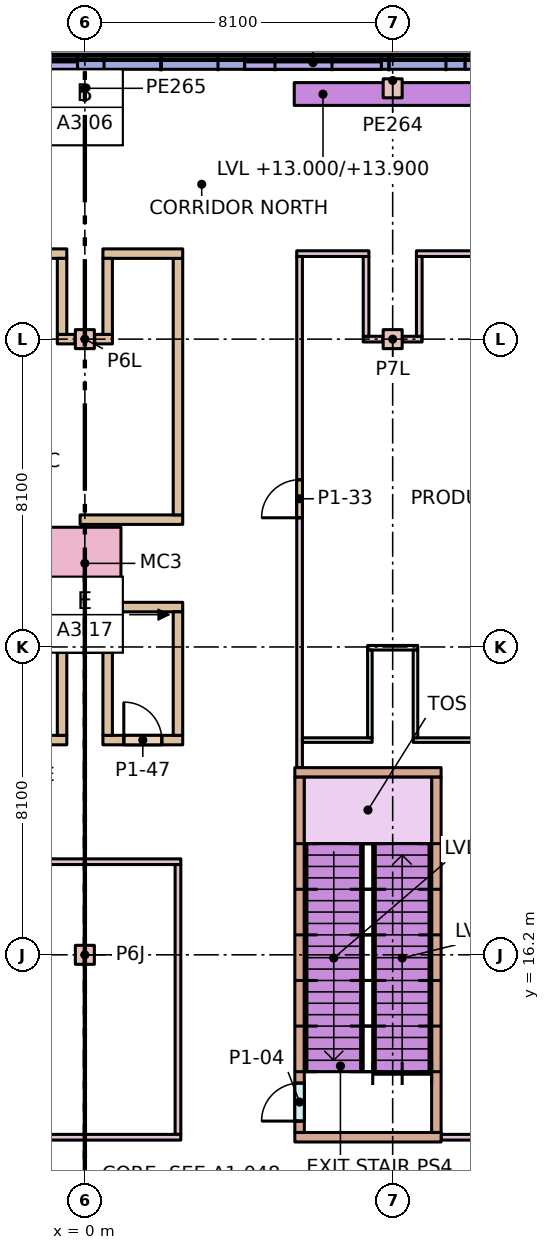
"""IFC4 building model, lengths in metres.
Left out: names, types, materials, properties, quantities, classifications, styles, units other than length and angle.
Written with IfcOpenShell. Run it as: python <this file> out.ifc"""

import sys

from ifc_helpers import new_model, si_unit, direction, frame, frame_2d, origin, origin_2d, place, context, subcontext, project, spatial, rectangle, extrude, element, fill, save


model = new_model("IFC4")
c1 = context("Model", 3, precision=1e-05, world=origin(), true_north=direction((0.0, 1.0)))
c2 = subcontext(c1, "Body", "Model", "MODEL_VIEW")
j1 = project(units=[si_unit("LENGTHUNIT", "METRE"), si_unit("PLANEANGLEUNIT", "RADIAN")], contexts=[c1])
p1 = place(None, origin())
s1 = spatial("IfcSite", under=j1, at=p1, CompositionType="ELEMENT")
p2 = place(p1, origin())
s2 = spatial("IfcBuilding", under=s1, at=p2, CompositionType="ELEMENT")
p3 = place(p2, frame((0.0, 0.0, 6.0)))
s3 = spatial("IfcBuildingStorey", under=s2, at=p3, CompositionType="ELEMENT", Elevation=6.0)
for number, where, z_axis, x_axis in (
    (1, (0.0, 16.2, 0.0), (0.0, 0.0, 1.0), (1.0, 0.0, 0.0)),
    (2, (0.0, 32.4, 0.0), (0.0, 0.0, 1.0), (1.0, 0.0, 0.0)),
    (3, (8.1, 32.4, 0.0), (0.0, 0.0, 1.0), (1.0, 0.0, 0.0)),
    (4, (8.1, 39.0, 0.0), (0.0, 0.0, 1.0), (1.0, 0.0, 0.0)),
    (5, (0.0, 39.0, 0.0), (0.0, 0.0, 1.0), (1.0, 0.0, 0.0)),
):
    element("IfcColumn", number, at=place(p3, frame(where, z_axis=z_axis, x_axis=x_axis)), inside=s3, PredefinedType="COLUMN", context=c2, shape_type="SweptSolid", body=[
        extrude(rectangle(XDim=0.5, YDim=0.5, at=origin_2d()), origin(), (0.0, 0.0, 1.0), 7.0),
    ])
p4 = place(p3, frame((0.0, 26.5, 0.0), z_axis=(0.0, 0.0, 1.0), x_axis=(-1.0, 0.0, 0.0)))
e6 = element("IfcColumn", 6, at=p4, inside=s3, PredefinedType="COLUMN", context=c2, shape_type="SweptSolid", body=[
    extrude(rectangle(XDim=1.9, YDim=1.9, at=origin_2d()), origin(), (0.0, 0.0, 1.0), 7.0),
])
p5 = place(p3, frame((17.998, 39.675, 0.0), z_axis=(0.0, 0.0, 1.0), x_axis=(-1.0, 0.0, 0.0)))
e7 = element("IfcWall", 7, at=p5, inside=s3, PredefinedType="STANDARD", context=c2, shape_type="SweptSolid", body=[
    extrude(rectangle(XDim=7.997, YDim=0.35, at=frame_2d((3.998, 0.0))), origin(), (0.0, 0.0, 1.0), 6.68),
])
p6 = place(p5, frame((2.198, 0.0, 1.0)))
e8 = element("IfcOpeningElement", 8, at=p6, cuts=e7, PredefinedType="OPENING", context=c2, shape_type="SweptSolid", body=[
    extrude(rectangle(XDim=3.6, YDim=4.0, at=frame_2d((1.8, 2.0))), frame((0.0, 0.185, 0.0), z_axis=(0.0, -1.0, 0.0), x_axis=(1.0, 0.0, 0.0)), (0.0, 0.0, 1.0), 0.37),
])
p7 = place(p3, frame((10.002, 39.675, 0.0), z_axis=(0.0, 0.0, 1.0), x_axis=(-1.0, 0.0, 0.0)))
e9 = element("IfcWall", 9, at=p7, inside=s3, PredefinedType="STANDARD", context=c2, shape_type="SweptSolid", body=[
    extrude(rectangle(XDim=7.996, YDim=0.35, at=frame_2d((3.998, 0.0))), origin(), (0.0, 0.0, 1.0), 6.68),
])
p8 = place(p7, frame((2.198, 0.0, 1.0)))
e10 = element("IfcOpeningElement", 10, at=p8, cuts=e9, PredefinedType="OPENING", context=c2, shape_type="SweptSolid", body=[
    extrude(rectangle(XDim=3.6, YDim=4.0, at=frame_2d((1.8, 2.0))), frame((0.0, 0.185, 0.0), z_axis=(0.0, -1.0, 0.0), x_axis=(1.0, 0.0, 0.0)), (0.0, 0.0, 1.0), 0.37),
])
p9 = place(p3, frame((2.005, 39.675, 0.0), z_axis=(0.0, 0.0, 1.0), x_axis=(-1.0, 0.0, 0.0)))
e11 = element("IfcWall", 11, at=p9, inside=s3, PredefinedType="STANDARD", context=c2, shape_type="SweptSolid", body=[
    extrude(rectangle(XDim=7.997, YDim=0.35, at=frame_2d((3.998, 0.0))), origin(), (0.0, 0.0, 1.0), 6.68),
])
p10 = place(p9, frame((2.198, 0.0, 1.0)))
e12 = element("IfcOpeningElement", 12, at=p10, cuts=e11, PredefinedType="OPENING", context=c2, shape_type="SweptSolid", body=[
    extrude(rectangle(XDim=3.6, YDim=4.0, at=frame_2d((1.8, 2.0))), frame((0.0, 0.185, 0.0), z_axis=(0.0, -1.0, 0.0), x_axis=(1.0, 0.0, 0.0)), (0.0, 0.0, 1.0), 0.37),
])
p11 = place(p3, frame((10.51, 38.85, 7.0), z_axis=(0.0, 0.0, 1.0), x_axis=(-1.0, 0.0, 0.0)))
e13 = element("IfcWall", 13, at=p11, inside=s3, PredefinedType="PARAPET", context=c2, shape_type="SweptSolid", body=[
    extrude(rectangle(XDim=5.0, YDim=0.6, at=frame_2d((2.5, 0.0))), origin(), (0.0, 0.0, 1.0), 0.9),
])
p12 = place(p3, frame((7.325, 32.4, 0.0), z_axis=(0.0, 0.0, 1.0), x_axis=(1.0, 0.0, 0.0)))
e14 = element("IfcWall", 14, at=p12, inside=s3, PredefinedType="PARTITIONING", context=c2, shape_type="SweptSolid", body=[
    extrude(rectangle(XDim=0.515, YDim=0.15, at=frame_2d((0.258, 0.0))), origin(), (0.0, 0.0, 1.0), 6.68),
])
p13 = place(p3, frame((8.36, 32.4, 0.0), z_axis=(0.0, 0.0, 1.0), x_axis=(1.0, 0.0, 0.0)))
e15 = element("IfcWall", 15, at=p13, inside=s3, PredefinedType="PARTITIONING", context=c2, shape_type="SweptSolid", body=[
    extrude(rectangle(XDim=0.515, YDim=0.15, at=frame_2d((0.257, 0.0))), origin(), (0.0, 0.0, 1.0), 6.68),
])
p14 = place(p3, frame((5.575, 34.65, 0.0), z_axis=(0.0, 0.0, 1.0), x_axis=(1.0, 0.0, 0.0)))
e16 = element("IfcWall", 16, at=p14, inside=s3, PredefinedType="PARTITIONING", context=c2, shape_type="SweptSolid", body=[
    extrude(rectangle(XDim=1.9, YDim=0.15, at=frame_2d((0.95, 0.0))), origin(), (0.0, 0.0, 1.0), 6.68),
])
p15 = place(p3, frame((8.725, 34.65, 0.0), z_axis=(0.0, 0.0, 1.0), x_axis=(1.0, 0.0, 0.0)))
e17 = element("IfcWall", 17, at=p15, inside=s3, PredefinedType="PARTITIONING", context=c2, shape_type="SweptSolid", body=[
    extrude(rectangle(XDim=16.443, YDim=0.15, at=frame_2d((8.221, 0.0))), origin(), (0.0, 0.0, 1.0), 6.68),
])
p16 = place(p15, frame((11.031, 0.0, 0.0)))
e18 = element("IfcOpeningElement", 18, at=p16, cuts=e17, PredefinedType="OPENING", context=c2, shape_type="SweptSolid", body=[
    extrude(rectangle(XDim=1.0, YDim=2.1, at=frame_2d((0.5, 1.05))), frame((0.0, 0.085, 0.0), z_axis=(0.0, -1.0, 0.0), x_axis=(1.0, 0.0, 0.0)), (0.0, 0.0, 1.0), 0.17),
])
for number, where, z_axis, x_axis in (
    (19, (7.4, 32.475, 0.0), (0.0, 0.0, 1.0), (0.0, 1.0, 0.0)),
    (20, (8.8, 32.475, 0.0), (0.0, 0.0, 1.0), (0.0, 1.0, 0.0)),
):
    element("IfcWall", number, at=place(p3, frame(where, z_axis=z_axis, x_axis=x_axis)), inside=s3, PredefinedType="PARTITIONING", context=c2, shape_type="SweptSolid", body=[
        extrude(rectangle(XDim=2.1, YDim=0.15, at=frame_2d((1.05, 0.0))), origin(), (0.0, 0.0, 1.0), 6.68),
    ])
p17 = place(p3, frame((5.725, 21.85, 0.0), z_axis=(0.0, 0.0, 1.0), x_axis=(1.0, 0.0, 0.0)))
e21 = element("IfcWall", 21, at=p17, inside=s3, PredefinedType="PARTITIONING", context=c2, shape_type="SweptSolid", body=[
    extrude(rectangle(XDim=1.835, YDim=0.12, at=frame_2d((0.917, 0.0))), origin(), (0.0, 0.0, 1.0), 6.68),
])
p18 = place(p3, frame((8.64, 21.85, 0.0), z_axis=(0.0, 0.0, 1.0), x_axis=(1.0, 0.0, 0.0)))
e22 = element("IfcWall", 22, at=p18, inside=s3, PredefinedType="PARTITIONING", context=c2, shape_type="SweptSolid", body=[
    extrude(rectangle(XDim=16.528, YDim=0.12, at=frame_2d((8.264, 0.0))), origin(), (0.0, 0.0, 1.0), 6.68),
])
p19 = place(p3, frame((7.44, 24.28, 0.0), z_axis=(0.0, 0.0, 1.0), x_axis=(1.0, 0.0, 0.0)))
e23 = element("IfcWall", 23, at=p19, inside=s3, PredefinedType="PARTITIONING", context=c2, shape_type="SweptSolid", body=[
    extrude(rectangle(XDim=1.32, YDim=0.12, at=frame_2d((0.66, 0.0))), origin(), (0.0, 0.0, 1.0), 6.68),
])
for number, where, z_axis, x_axis in (
    (24, (7.5, 21.91, 0.0), (0.0, 0.0, 1.0), (0.0, 1.0, 0.0)),
    (25, (8.7, 21.91, 0.0), (0.0, 0.0, 1.0), (0.0, 1.0, 0.0)),
):
    element("IfcWall", number, at=place(p3, frame(where, z_axis=z_axis, x_axis=x_axis)), inside=s3, PredefinedType="PARTITIONING", context=c2, shape_type="SweptSolid", body=[
        extrude(rectangle(XDim=2.31, YDim=0.12, at=frame_2d((1.155, 0.0))), origin(), (0.0, 0.0, 1.0), 6.68),
    ])
p20 = place(p3, frame((-10.593, 21.85, 0.0), z_axis=(0.0, 0.0, 1.0), x_axis=(1.0, 0.0, 0.0)))
e26 = element("IfcWall", 26, at=p20, inside=s3, PredefinedType="PARTITIONING", context=c2, shape_type="SweptSolid", body=[
    extrude(rectangle(XDim=10.118, YDim=0.25, at=frame_2d((5.059, 0.0))), origin(), (0.0, 0.0, 1.0), 6.68),
])
p21 = place(p3, frame((0.475, 21.85, 0.0), z_axis=(0.0, 0.0, 1.0), x_axis=(1.0, 0.0, 0.0)))
e27 = element("IfcWall", 27, at=p21, inside=s3, PredefinedType="PARTITIONING", context=c2, shape_type="SweptSolid", body=[
    extrude(rectangle(XDim=2.1, YDim=0.25, at=frame_2d((1.05, 0.0))), origin(), (0.0, 0.0, 1.0), 6.68),
])
p22 = place(p21, frame((0.55, 0.0, 0.0)))
e28 = element("IfcOpeningElement", 28, at=p22, cuts=e27, PredefinedType="OPENING", context=c2, shape_type="SweptSolid", body=[
    extrude(rectangle(XDim=1.0, YDim=2.1, at=frame_2d((0.5, 1.05))), frame((0.0, 0.135, 0.0), z_axis=(0.0, -1.0, 0.0), x_axis=(1.0, 0.0, 0.0)), (0.0, 0.0, 1.0), 0.27),
])
p23 = place(p3, frame((-0.725, 24.28, 0.0), z_axis=(0.0, 0.0, 1.0), x_axis=(1.0, 0.0, 0.0)))
e29 = element("IfcWall", 29, at=p23, inside=s3, PredefinedType="PARTITIONING", context=c2, shape_type="SweptSolid", body=[
    extrude(rectangle(XDim=1.45, YDim=0.25, at=frame_2d((0.725, 0.0))), origin(), (0.0, 0.0, 1.0), 6.68),
])
for number, where, z_axis, x_axis in (
    (30, (-0.6, 21.975, 0.0), (0.0, 0.0, 1.0), (0.0, 1.0, 0.0)),
    (31, (0.6, 21.975, 0.0), (0.0, 0.0, 1.0), (0.0, 1.0, 0.0)),
):
    element("IfcWall", number, at=place(p3, frame(where, z_axis=z_axis, x_axis=x_axis)), inside=s3, PredefinedType="PARTITIONING", context=c2, shape_type="SweptSolid", body=[
        extrude(rectangle(XDim=2.18, YDim=0.25, at=frame_2d((1.09, 0.0))), origin(), (0.0, 0.0, 1.0), 6.68),
    ])
p24 = place(p3, frame((-17.778, 18.65, 0.0), z_axis=(0.0, 0.0, 1.0), x_axis=(1.0, 0.0, 0.0)))
e32 = element("IfcWall", 32, at=p24, inside=s3, PredefinedType="PARTITIONING", context=c2, shape_type="SweptSolid", body=[
    extrude(rectangle(XDim=20.303, YDim=0.15, at=frame_2d((10.152, 0.0))), origin(), (0.0, 0.0, 1.0), 6.68),
])
p25 = place(p24, frame((9.65, 0.0, 0.0)))
e33 = element("IfcOpeningElement", 33, at=p25, cuts=e32, PredefinedType="OPENING", context=c2, shape_type="SweptSolid", body=[
    extrude(rectangle(XDim=1.0, YDim=2.1, at=frame_2d((0.5, 1.05))), frame((0.0, 0.085, 0.0), z_axis=(0.0, -1.0, 0.0), x_axis=(1.0, 0.0, 0.0)), (0.0, 0.0, 1.0), 0.17),
])
p26 = place(p3, frame((5.65, 21.125, 0.0), z_axis=(0.0, 0.0, 1.0), x_axis=(0.0, 1.0, 0.0)))
e34 = element("IfcWall", 34, at=p26, inside=s3, PredefinedType="PARTITIONING", context=c2, shape_type="SweptSolid", body=[
    extrude(rectangle(XDim=13.45, YDim=0.15, at=frame_2d((6.725, 0.0))), origin(), (0.0, 0.0, 1.0), 6.68),
])
p27 = place(p26, frame((6.575, 0.0, 0.0)))
e35 = element("IfcOpeningElement", 35, at=p27, cuts=e34, PredefinedType="OPENING", context=c2, shape_type="SweptSolid", body=[
    extrude(rectangle(XDim=1.0, YDim=2.1, at=frame_2d((0.5, 1.05))), frame((0.0, 0.085, 0.0), z_axis=(0.0, -1.0, 0.0), x_axis=(1.0, 0.0, 0.0)), (0.0, 0.0, 1.0), 0.17),
])
p28 = place(p3, frame((5.525, 21.0, 0.0), z_axis=(0.0, 0.0, 1.0), x_axis=(1.0, 0.0, 0.0)))
e36 = element("IfcWall", 36, at=p28, inside=s3, PredefinedType="STANDARD", context=c2, shape_type="SweptSolid", body=[
    extrude(rectangle(XDim=3.85, YDim=0.25, at=frame_2d((1.925, 0.0))), origin(), (0.0, 0.0, 1.0), 6.68),
])
p29 = place(p3, frame((9.25, 11.525, 0.0), z_axis=(0.0, 0.0, 1.0), x_axis=(0.0, 1.0, 0.0)))
e37 = element("IfcWall", 37, at=p29, inside=s3, PredefinedType="STANDARD", context=c2, shape_type="SweptSolid", body=[
    extrude(rectangle(XDim=9.35, YDim=0.25, at=frame_2d((4.675, 0.0))), origin(), (0.0, 0.0, 1.0), 6.68),
])
p30 = place(p3, frame((9.375, 11.4, 0.0), z_axis=(0.0, 0.0, 1.0), x_axis=(1.0, 0.0, 0.0)))
e38 = element("IfcWall", 38, at=p30, inside=s3, PredefinedType="PARTITIONING", context=c2, shape_type="SweptSolid", body=[
    extrude(rectangle(XDim=4.1, YDim=0.15, at=frame_2d((2.05, 0.0))), origin(), (0.0, 0.0, 1.0), 6.68),
])
p31 = place(p30, frame((1.55, 0.0, 0.0)))
e39 = element("IfcOpeningElement", 39, at=p31, cuts=e38, PredefinedType="OPENING", context=c2, shape_type="SweptSolid", body=[
    extrude(rectangle(XDim=1.0, YDim=2.1, at=frame_2d((0.5, 1.05))), frame((0.0, 0.085, 0.0), z_axis=(0.0, -1.0, 0.0), x_axis=(1.0, 0.0, 0.0)), (0.0, 0.0, 1.0), 0.17),
])
p32 = place(p3, frame((5.65, 11.525, 0.0), z_axis=(0.0, 0.0, 1.0), x_axis=(0.0, 1.0, 0.0)))
e40 = element("IfcWall", 40, at=p32, inside=s3, PredefinedType="STANDARD", context=c2, shape_type="SweptSolid", body=[
    extrude(rectangle(XDim=9.35, YDim=0.25, at=frame_2d((4.675, 0.0))), origin(), (0.0, 0.0, 1.0), 6.68),
])
p33 = place(p32, frame((0.3, 0.0, 0.0)))
e41 = element("IfcOpeningElement", 41, at=p33, cuts=e40, PredefinedType="OPENING", context=c2, shape_type="SweptSolid", body=[
    extrude(rectangle(XDim=1.0, YDim=2.1, at=frame_2d((0.5, 1.05))), frame((0.0, 0.135, 0.0), z_axis=(0.0, -1.0, 0.0), x_axis=(1.0, 0.0, 0.0)), (0.0, 0.0, 1.0), 0.27),
])
for number, where, z_axis, x_axis in (
    (42, (-0.125, 25.35, 0.0), (0.0, 0.0, 1.0), (1.0, 0.0, 0.0)),
    (43, (-0.125, 27.65, 0.0), (0.0, 0.0, 1.0), (1.0, 0.0, 0.0)),
):
    element("IfcWall", number, at=place(p3, frame(where, z_axis=z_axis, x_axis=x_axis)), inside=s3, PredefinedType="PARTITIONING", context=c2, shape_type="SweptSolid", body=[
        extrude(rectangle(XDim=2.7, YDim=0.25, at=frame_2d((1.35, 0.0))), origin(), (0.0, 0.0, 1.0), 6.68),
    ])
p34 = place(p3, frame((2.45, 21.975, 0.0), z_axis=(0.0, 0.0, 1.0), x_axis=(0.0, 1.0, 0.0)))
e44 = element("IfcWall", 44, at=p34, inside=s3, PredefinedType="PARTITIONING", context=c2, shape_type="SweptSolid", body=[
    extrude(rectangle(XDim=3.25, YDim=0.25, at=frame_2d((1.625, 0.0))), origin(), (0.0, 0.0, 1.0), 6.68),
])
p35 = place(p3, frame((2.45, 27.775, 0.0), z_axis=(0.0, 0.0, 1.0), x_axis=(0.0, 1.0, 0.0)))
e45 = element("IfcWall", 45, at=p35, inside=s3, PredefinedType="PARTITIONING", context=c2, shape_type="SweptSolid", body=[
    extrude(rectangle(XDim=6.75, YDim=0.25, at=frame_2d((3.375, 0.0))), origin(), (0.0, 0.0, 1.0), 6.68),
])
p36 = place(p3, frame((2.45, 11.475, 0.0), z_axis=(0.0, 0.0, 1.0), x_axis=(0.0, 1.0, 0.0)))
e46 = element("IfcWall", 46, at=p36, inside=s3, PredefinedType="PARTITIONING", context=c2, shape_type="SweptSolid", body=[
    extrude(rectangle(XDim=7.1, YDim=0.15, at=frame_2d((3.55, 0.0))), origin(), (0.0, 0.0, 1.0), 6.68),
])
for number, where, z_axis, x_axis in (
    (47, (-0.725, 32.4, 0.0), (0.0, 0.0, 1.0), (1.0, 0.0, 0.0)),
    (48, (0.26, 32.4, 0.0), (0.0, 0.0, 1.0), (1.0, 0.0, 0.0)),
):
    element("IfcWall", number, at=place(p3, frame(where, z_axis=z_axis, x_axis=x_axis)), inside=s3, PredefinedType="PARTITIONING", context=c2, shape_type="SweptSolid", body=[
        extrude(rectangle(XDim=0.465, YDim=0.25, at=frame_2d((0.232, 0.0))), origin(), (0.0, 0.0, 1.0), 6.68),
    ])
p37 = place(p3, frame((-1.025, 34.65, 0.0), z_axis=(0.0, 0.0, 1.0), x_axis=(1.0, 0.0, 0.0)))
e49 = element("IfcWall", 49, at=p37, inside=s3, PredefinedType="PARTITIONING", context=c2, shape_type="SweptSolid", body=[
    extrude(rectangle(XDim=0.55, YDim=0.25, at=frame_2d((0.275, 0.0))), origin(), (0.0, 0.0, 1.0), 6.68),
])
p38 = place(p3, frame((0.475, 34.65, 0.0), z_axis=(0.0, 0.0, 1.0), x_axis=(1.0, 0.0, 0.0)))
e50 = element("IfcWall", 50, at=p38, inside=s3, PredefinedType="PARTITIONING", context=c2, shape_type="SweptSolid", body=[
    extrude(rectangle(XDim=2.1, YDim=0.25, at=frame_2d((1.05, 0.0))), origin(), (0.0, 0.0, 1.0), 6.68),
])
for number, where, z_axis, x_axis in (
    (51, (-0.6, 32.525, 0.0), (0.0, 0.0, 1.0), (0.0, 1.0, 0.0)),
    (52, (0.6, 32.525, 0.0), (0.0, 0.0, 1.0), (0.0, 1.0, 0.0)),
):
    element("IfcWall", number, at=place(p3, frame(where, z_axis=z_axis, x_axis=x_axis)), inside=s3, PredefinedType="PARTITIONING", context=c2, shape_type="SweptSolid", body=[
        extrude(rectangle(XDim=2.0, YDim=0.25, at=frame_2d((1.0, 0.0))), origin(), (0.0, 0.0, 1.0), 6.68),
    ])
p39 = place(p3, frame((5.525, 11.4, 0.0), z_axis=(0.0, 0.0, 1.0), x_axis=(1.0, 0.0, 0.0)))
e53 = element("IfcWall", 53, at=p39, inside=s3, PredefinedType="STANDARD", context=c2, shape_type="SweptSolid", body=[
    extrude(rectangle(XDim=3.85, YDim=0.25, at=frame_2d((1.925, 0.0))), origin(), (0.0, 0.0, 1.0), 6.68),
])
p40 = place(p3, frame((-13.275, 11.4, 0.0), z_axis=(0.0, 0.0, 1.0), x_axis=(1.0, 0.0, 0.0)))
e54 = element("IfcWall", 54, at=p40, inside=s3, PredefinedType="PARTITIONING", context=c2, shape_type="SweptSolid", body=[
    extrude(rectangle(XDim=15.8, YDim=0.15, at=frame_2d((7.9, 0.0))), origin(), (0.0, 0.0, 1.0), 6.68),
])
p41 = place(p8, origin())
e55 = element("IfcWindow", 55, at=p41, inside=s3, PartitioningType="SINGLE_PANEL", PredefinedType="WINDOW", context=c2, shape_type="SweptSolid", body=[
    extrude(rectangle(XDim=3.6, YDim=4.0, at=frame_2d((1.8, 2.0))), frame((0.0, 0.03, 0.0), z_axis=(0.0, -1.0, 0.0), x_axis=(1.0, 0.0, 0.0)), (0.0, 0.0, 1.0), 0.06),
])
fill(e10, e55)
p42 = place(p10, origin())
e56 = element("IfcWindow", 56, at=p42, inside=s3, PartitioningType="SINGLE_PANEL", PredefinedType="WINDOW", context=c2, shape_type="SweptSolid", body=[
    extrude(rectangle(XDim=3.6, YDim=4.0, at=frame_2d((1.8, 2.0))), frame((0.0, 0.03, 0.0), z_axis=(0.0, -1.0, 0.0), x_axis=(1.0, 0.0, 0.0)), (0.0, 0.0, 1.0), 0.06),
])
fill(e12, e56)
p43 = place(p33, origin())
e57 = element("IfcDoor", 57, at=p43, inside=s3, OperationType="SINGLE_SWING_LEFT", PredefinedType="DOOR", context=c2, shape_type="SweptSolid", body=[
    extrude(rectangle(XDim=1.0, YDim=2.1, at=frame_2d((0.5, 1.05))), frame((0.0, 0.025, 0.0), z_axis=(0.0, -1.0, 0.0), x_axis=(1.0, 0.0, 0.0)), (0.0, 0.0, 1.0), 0.05),
])
fill(e41, e57)
p44 = place(p27, origin())
e58 = element("IfcDoor", 58, at=p44, inside=s3, OperationType="SINGLE_SWING_LEFT", PredefinedType="DOOR", context=c2, shape_type="SweptSolid", body=[
    extrude(rectangle(XDim=1.0, YDim=2.1, at=frame_2d((0.5, 1.05))), frame((0.0, 0.025, 0.0), z_axis=(0.0, -1.0, 0.0), x_axis=(1.0, 0.0, 0.0)), (0.0, 0.0, 1.0), 0.05),
])
fill(e35, e58)
p45 = place(p22, origin())
e59 = element("IfcDoor", 59, at=p45, inside=s3, OperationType="SINGLE_SWING_LEFT", PredefinedType="DOOR", context=c2, shape_type="SweptSolid", body=[
    extrude(rectangle(XDim=1.0, YDim=2.1, at=frame_2d((0.5, 1.05))), frame((0.0, 0.025, 0.0), z_axis=(0.0, -1.0, 0.0), x_axis=(1.0, 0.0, 0.0)), (0.0, 0.0, 1.0), 0.05),
])
fill(e28, e59)
save(model, sys.argv[1])
